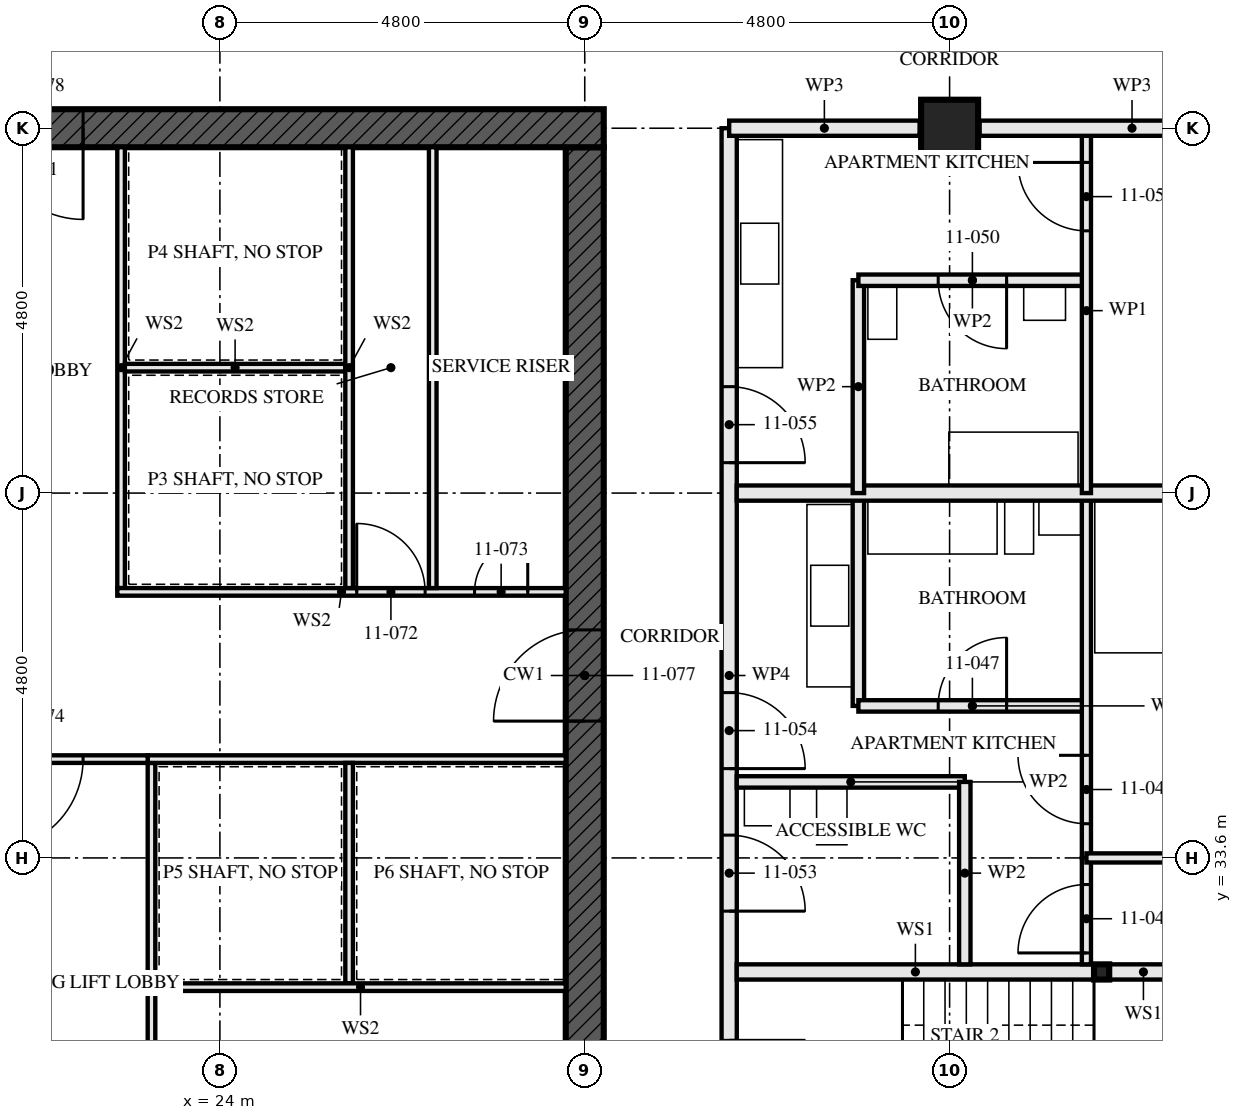
"""IFC4 building model, lengths in metres.
Left out: names, types, materials, properties, quantities, classifications, styles, units other than length and angle.
Written with IfcOpenShell. Run it as: python <this file> out.ifc"""

import sys

from ifc_helpers import new_model, si_unit, direction, frame, frame_2d, origin, origin_2d, place, context, subcontext, project, spatial, rectangle, hollow_rectangle, extrude, element, fill, save


model = new_model("IFC4")
c1 = context("Model", 3, precision=1e-05, world=origin(), true_north=direction((0.0, 1.0)))
c2 = subcontext(c1, "Body", "Model", "MODEL_VIEW")
j1 = project(units=[si_unit("LENGTHUNIT", "METRE"), si_unit("PLANEANGLEUNIT", "RADIAN")], contexts=[c1])
p1 = place(None, origin())
s1 = spatial("IfcSite", under=j1, at=p1, CompositionType="ELEMENT")
p2 = place(p1, origin())
s2 = spatial("IfcBuilding", under=s1, at=p2, CompositionType="ELEMENT")
p3 = place(p2, frame((0.0, 0.0, 44.5)))
s3 = spatial("IfcBuildingStorey", under=s2, at=p3, CompositionType="ELEMENT", Elevation=44.5)
p4 = place(p3, frame((33.6, 43.2, 0.0), z_axis=(0.0, 0.0, 1.0), x_axis=(0.0, 1.0, 0.0)))
e1 = element("IfcColumn", 1, at=p4, inside=s3, PredefinedType="COLUMN", context=c2, shape_type="SweptSolid", body=[
    extrude(hollow_rectangle(XDim=0.75, YDim=0.75, WallThickness=0.08, at=origin_2d()), origin(), (0.0, 0.0, 1.0), 3.5),
])
p5 = place(p3, frame((29.05, 43.2, -0.17), z_axis=(0.0, 0.0, 1.0), x_axis=(-1.0, 0.0, 0.0)))
e2 = element("IfcWall", 2, at=p5, inside=s3, PredefinedType="SHEAR", context=c2, shape_type="SweptSolid", body=[
    extrude(rectangle(XDim=14.9, YDim=0.5, at=frame_2d((7.45, 0.0))), origin(), (0.0, 0.0, 1.0), 3.5),
])
p6 = place(p5, frame((6.85, 0.0, 0.17)))
e3 = element("IfcOpeningElement", 3, at=p6, cuts=e2, PredefinedType="OPENING", context=c2, shape_type="SweptSolid", body=[
    extrude(rectangle(XDim=1.2, YDim=2.1, at=frame_2d((0.6, 1.05))), frame((0.0, 0.26, 0.0), z_axis=(0.0, -1.0, 0.0), x_axis=(1.0, 0.0, 0.0)), (0.0, 0.0, 1.0), 0.521),
])
p7 = place(p3, frame((28.8, 29.05, -0.17), z_axis=(0.0, 0.0, 1.0), x_axis=(0.0, 1.0, 0.0)))
e4 = element("IfcWall", 4, at=p7, inside=s3, PredefinedType="SHEAR", context=c2, shape_type="SweptSolid", body=[
    extrude(rectangle(XDim=13.9, YDim=0.5, at=frame_2d((6.95, 0.0))), origin(), (0.0, 0.0, 1.0), 3.5),
])
p8 = place(p7, frame((6.35, 0.0, 0.17)))
e5 = element("IfcOpeningElement", 5, at=p8, cuts=e4, PredefinedType="OPENING", context=c2, shape_type="SweptSolid", body=[
    extrude(rectangle(XDim=1.2, YDim=2.1, at=frame_2d((0.6, 1.05))), frame((0.0, 0.26, 0.0), z_axis=(0.0, -1.0, 0.0), x_axis=(1.0, 0.0, 0.0)), (0.0, 0.0, 1.0), 0.521),
])
p9 = place(p3, frame((35.6, 32.1, 0.0), z_axis=(0.0, 0.0, 1.0), x_axis=(1.0, 0.0, 0.0)))
e6 = element("IfcColumn", 6, at=p9, inside=s3, PredefinedType="COLUMN", context=c2, shape_type="SweptSolid", body=[
    extrude(hollow_rectangle(XDim=0.2, YDim=0.2, WallThickness=0.008, at=origin_2d()), origin(), (0.0, 0.0, 1.0), 3.33),
])
p10 = place(p3, frame((36.6, 32.1, 0.0), z_axis=(0.0, 0.0, 1.0), x_axis=(-1.0, 0.0, 0.0)))
e7 = element("IfcWall", 7, at=p10, inside=s3, PredefinedType="SOLIDWALL", context=c2, shape_type="SweptSolid", body=[
    extrude(rectangle(XDim=0.9, YDim=0.2, at=frame_2d((0.45, 0.0))), origin(), (0.0, 0.0, 1.0), 2.99),
])
p11 = place(p3, frame((35.5, 32.1, 0.0), z_axis=(0.0, 0.0, 1.0), x_axis=(-1.0, 0.0, 0.0)))
e8 = element("IfcWall", 8, at=p11, inside=s3, PredefinedType="SOLIDWALL", context=c2, shape_type="SweptSolid", body=[
    extrude(rectangle(XDim=4.7, YDim=0.2, at=frame_2d((2.35, 0.0))), origin(), (0.0, 0.0, 1.0), 2.99),
])
p12 = place(p3, frame((33.8, 32.2, 0.0), z_axis=(0.0, 0.0, 1.0), x_axis=(0.0, 1.0, 0.0)))
e9 = element("IfcWall", 9, at=p12, inside=s3, PredefinedType="PARTITIONING", context=c2, shape_type="SweptSolid", body=[
    extrude(rectangle(XDim=2.4, YDim=0.15, at=frame_2d((1.2, 0.0))), origin(), (0.0, 0.0, 1.0), 2.55),
])
p13 = place(p3, frame((33.8, 34.6, 0.0), z_axis=(0.0, 0.0, 1.0), x_axis=(-1.0, 0.0, 0.0)))
e10 = element("IfcWall", 10, at=p13, inside=s3, PredefinedType="PARTITIONING", context=c2, shape_type="SweptSolid", body=[
    extrude(rectangle(XDim=3.0, YDim=0.15, at=frame_2d((1.5, 0.0))), origin(), (0.0, 0.0, 1.0), 3.33),
])
p14 = place(p3, frame((35.4, 35.6, 0.0), z_axis=(0.0, 0.0, 1.0), x_axis=(-1.0, 0.0, 0.0)))
e11 = element("IfcWall", 11, at=p14, inside=s3, PredefinedType="PARTITIONING", context=c2, shape_type="SweptSolid", body=[
    extrude(rectangle(XDim=3.0, YDim=0.15, at=frame_2d((1.5, 0.0))), origin(), (0.0, 0.0, 1.0), 3.33),
])
p15 = place(p14, frame((1.05, 0.0, 0.0)))
e12 = element("IfcOpeningElement", 12, at=p15, cuts=e11, PredefinedType="OPENING", context=c2, shape_type="SweptSolid", body=[
    extrude(rectangle(XDim=0.9, YDim=2.1, at=frame_2d((0.45, 1.05))), frame((0.0, 0.085, 0.0), z_axis=(0.0, -1.0, 0.0), x_axis=(1.0, 0.0, 0.0)), (0.0, 0.0, 1.0), 0.171),
])
p16 = place(p3, frame((32.4, 35.6, 0.0), z_axis=(0.0, 0.0, 1.0), x_axis=(0.0, 1.0, 0.0)))
e13 = element("IfcWall", 13, at=p16, inside=s3, PredefinedType="PARTITIONING", context=c2, shape_type="SweptSolid", body=[
    extrude(rectangle(XDim=2.8, YDim=0.15, at=frame_2d((1.4, 0.0))), origin(), (0.0, 0.0, 1.0), 3.33),
])
p17 = place(p3, frame((35.4, 32.2, 0.0), z_axis=(0.0, 0.0, 1.0), x_axis=(0.0, 1.0, 0.0)))
e14 = element("IfcWall", 14, at=p17, inside=s3, PredefinedType="PARTITIONING", context=c2, shape_type="SweptSolid", body=[
    extrude(rectangle(XDim=1.4, YDim=0.12, at=frame_2d((0.7, 0.0))), origin(), (0.0, 0.0, 1.0), 3.33),
])
p18 = place(p17, frame((0.15, 0.0, 0.0)))
e15 = element("IfcOpeningElement", 15, at=p18, cuts=e14, PredefinedType="OPENING", context=c2, shape_type="SweptSolid", body=[
    extrude(rectangle(XDim=0.9, YDim=2.1, at=frame_2d((0.45, 1.05))), frame((0.0, 0.071, 0.0), z_axis=(0.0, -1.0, 0.0), x_axis=(1.0, 0.0, 0.0)), (0.0, 0.0, 1.0), 0.141),
])
p19 = place(p3, frame((35.4, 33.6, 0.0), z_axis=(0.0, 0.0, 1.0), x_axis=(0.0, 1.0, 0.0)))
e16 = element("IfcWall", 16, at=p19, inside=s3, PredefinedType="PARTITIONING", context=c2, shape_type="SweptSolid", body=[
    extrude(rectangle(XDim=4.8, YDim=0.12, at=frame_2d((2.4, 0.0))), origin(), (0.0, 0.0, 1.0), 3.33),
])
p20 = place(p19, frame((0.45, 0.0, 0.0)))
e17 = element("IfcOpeningElement", 17, at=p20, cuts=e16, PredefinedType="OPENING", context=c2, shape_type="SweptSolid", body=[
    extrude(rectangle(XDim=0.9, YDim=2.1, at=frame_2d((0.45, 1.05))), frame((0.0, 0.071, 0.0), z_axis=(0.0, -1.0, 0.0), x_axis=(1.0, 0.0, 0.0)), (0.0, 0.0, 1.0), 0.141),
])
p21 = place(p3, frame((42.805, 33.6, 0.0), z_axis=(0.0, 0.0, 1.0), x_axis=(-1.0, 0.0, 0.0)))
e18 = element("IfcWall", 18, at=p21, inside=s3, PredefinedType="PARTITIONING", context=c2, shape_type="SweptSolid", body=[
    extrude(rectangle(XDim=7.405, YDim=0.12, at=frame_2d((3.703, 0.0))), origin(), (0.0, 0.0, 1.0), 2.55),
])
p22 = place(p3, frame((42.805, 38.4, 0.0), z_axis=(0.0, 0.0, 1.0), x_axis=(-1.0, 0.0, 0.0)))
e19 = element("IfcWall", 19, at=p22, inside=s3, PredefinedType="PARTITIONING", context=c2, shape_type="SweptSolid", body=[
    extrude(rectangle(XDim=12.005, YDim=0.2, at=frame_2d((6.002, 0.0))), origin(), (0.0, 0.0, 1.0), 2.55),
])
p23 = place(p3, frame((35.4, 41.2, 0.0), z_axis=(0.0, 0.0, 1.0), x_axis=(-1.0, 0.0, 0.0)))
e20 = element("IfcWall", 20, at=p23, inside=s3, PredefinedType="PARTITIONING", context=c2, shape_type="SweptSolid", body=[
    extrude(rectangle(XDim=3.0, YDim=0.15, at=frame_2d((1.5, 0.0))), origin(), (0.0, 0.0, 1.0), 3.33),
])
p24 = place(p23, frame((1.05, 0.0, 0.0)))
e21 = element("IfcOpeningElement", 21, at=p24, cuts=e20, PredefinedType="OPENING", context=c2, shape_type="SweptSolid", body=[
    extrude(rectangle(XDim=0.9, YDim=2.1, at=frame_2d((0.45, 1.05))), frame((0.0, 0.085, 0.0), z_axis=(0.0, -1.0, 0.0), x_axis=(1.0, 0.0, 0.0)), (0.0, 0.0, 1.0), 0.171),
])
p25 = place(p3, frame((32.4, 38.4, 0.0), z_axis=(0.0, 0.0, 1.0), x_axis=(0.0, 1.0, 0.0)))
e22 = element("IfcWall", 22, at=p25, inside=s3, PredefinedType="PARTITIONING", context=c2, shape_type="SweptSolid", body=[
    extrude(rectangle(XDim=2.8, YDim=0.15, at=frame_2d((1.4, 0.0))), origin(), (0.0, 0.0, 1.0), 3.33),
])
p26 = place(p3, frame((35.4, 38.4, 0.0), z_axis=(0.0, 0.0, 1.0), x_axis=(0.0, 1.0, 0.0)))
e23 = element("IfcWall", 23, at=p26, inside=s3, PredefinedType="PARTITIONING", context=c2, shape_type="SweptSolid", body=[
    extrude(rectangle(XDim=4.8, YDim=0.12, at=frame_2d((2.4, 0.0))), origin(), (0.0, 0.0, 1.0), 3.33),
])
p27 = place(p26, frame((3.45, 0.0, 0.0)))
e24 = element("IfcOpeningElement", 24, at=p27, cuts=e23, PredefinedType="OPENING", context=c2, shape_type="SweptSolid", body=[
    extrude(rectangle(XDim=0.9, YDim=2.1, at=frame_2d((0.45, 1.05))), frame((0.0, 0.071, 0.0), z_axis=(0.0, -1.0, 0.0), x_axis=(1.0, 0.0, 0.0)), (0.0, 0.0, 1.0), 0.141),
])
p28 = place(p3, frame((30.7, 28.8, 0.0), z_axis=(0.0, 0.0, 1.0), x_axis=(0.0, 1.0, 0.0)))
e25 = element("IfcWall", 25, at=p28, inside=s3, PredefinedType="PARTITIONING", context=c2, shape_type="SweptSolid", body=[
    extrude(rectangle(XDim=14.4, YDim=0.2, at=frame_2d((7.2, 0.0))), origin(), (0.0, 0.0, 1.0), 2.55),
])
p29 = place(p28, frame((1.4, 0.0, 0.0)))
e26 = element("IfcOpeningElement", 26, at=p29, cuts=e25, PredefinedType="OPENING", context=c2, shape_type="SweptSolid", body=[
    extrude(rectangle(XDim=1.0, YDim=2.1, at=frame_2d((0.5, 1.05))), frame((0.0, 0.111, 0.0), z_axis=(0.0, -1.0, 0.0), x_axis=(1.0, 0.0, 0.0)), (0.0, 0.0, 1.0), 0.221),
])
p30 = place(p28, frame((4.1, 0.0, 0.0)))
e27 = element("IfcOpeningElement", 27, at=p30, cuts=e25, PredefinedType="OPENING", context=c2, shape_type="SweptSolid", body=[
    extrude(rectangle(XDim=1.0, YDim=2.1, at=frame_2d((0.5, 1.05))), frame((0.0, 0.111, 0.0), z_axis=(0.0, -1.0, 0.0), x_axis=(1.0, 0.0, 0.0)), (0.0, 0.0, 1.0), 0.221),
])
p31 = place(p28, frame((5.975, 0.0, 0.0)))
e28 = element("IfcOpeningElement", 28, at=p31, cuts=e25, PredefinedType="OPENING", context=c2, shape_type="SweptSolid", body=[
    extrude(rectangle(XDim=1.0, YDim=2.1, at=frame_2d((0.5, 1.05))), frame((0.0, 0.111, 0.0), z_axis=(0.0, -1.0, 0.0), x_axis=(1.0, 0.0, 0.0)), (0.0, 0.0, 1.0), 0.221),
])
p32 = place(p28, frame((10.0, 0.0, 0.0)))
e29 = element("IfcOpeningElement", 29, at=p32, cuts=e25, PredefinedType="OPENING", context=c2, shape_type="SweptSolid", body=[
    extrude(rectangle(XDim=1.0, YDim=2.1, at=frame_2d((0.5, 1.05))), frame((0.0, 0.111, 0.0), z_axis=(0.0, -1.0, 0.0), x_axis=(1.0, 0.0, 0.0)), (0.0, 0.0, 1.0), 0.221),
])
for number, where, z_axis, x_axis in (
    (30, (26.8, 37.15, 0.0), (0.0, 0.0, 1.0), (0.0, 1.0, 0.0)),
    (31, (22.7, 37.15, 0.0), (0.0, 0.0, 1.0), (0.0, 1.0, 0.0)),
):
    element("IfcWall", number, at=place(p3, frame(where, z_axis=z_axis, x_axis=x_axis)), inside=s3, PredefinedType="SOLIDWALL", context=c2, shape_type="SweptSolid", body=[
        extrude(rectangle(XDim=5.8, YDim=0.1, at=frame_2d((2.9, 0.0))), origin(), (0.0, 0.0, 1.0), 3.33),
    ])
p33 = place(p3, frame((23.1, 29.05, 0.0), z_axis=(0.0, 0.0, 1.0), x_axis=(0.0, 1.0, 0.0)))
e32 = element("IfcWall", 32, at=p33, inside=s3, PredefinedType="SOLIDWALL", context=c2, shape_type="SweptSolid", body=[
    extrude(rectangle(XDim=5.8, YDim=0.1, at=frame_2d((2.9, 0.0))), origin(), (0.0, 0.0, 1.0), 3.33),
])
p34 = place(p33, frame((1.0, 0.0, 0.0)))
e33 = element("IfcOpeningElement", 33, at=p34, cuts=e32, PredefinedType="OPENING", context=c2, shape_type="SweptSolid", body=[
    extrude(rectangle(XDim=0.7, YDim=2.1, at=frame_2d((0.35, 1.05))), frame((0.0, 0.061, 0.0), z_axis=(0.0, -1.0, 0.0), x_axis=(1.0, 0.0, 0.0)), (0.0, 0.0, 1.0), 0.121),
])
p35 = place(p3, frame((23.05, 34.9, 0.0), z_axis=(0.0, 0.0, 1.0), x_axis=(1.0, 0.0, 0.0)))
e34 = element("IfcWall", 34, at=p35, inside=s3, PredefinedType="SOLIDWALL", context=c2, shape_type="SweptSolid", body=[
    extrude(rectangle(XDim=5.5, YDim=0.1, at=frame_2d((2.75, 0.0))), origin(), (0.0, 0.0, 1.0), 3.33),
])
p36 = place(p3, frame((22.65, 37.1, 0.0), z_axis=(0.0, 0.0, 1.0), x_axis=(1.0, 0.0, 0.0)))
e35 = element("IfcWall", 35, at=p36, inside=s3, PredefinedType="SOLIDWALL", context=c2, shape_type="SweptSolid", body=[
    extrude(rectangle(XDim=5.9, YDim=0.1, at=frame_2d((2.95, 0.0))), origin(), (0.0, 0.0, 1.0), 3.33),
])
p37 = place(p36, frame((3.15, 0.0, 0.0)))
e36 = element("IfcOpeningElement", 36, at=p37, cuts=e35, PredefinedType="OPENING", context=c2, shape_type="SweptSolid", body=[
    extrude(rectangle(XDim=0.9, YDim=2.1, at=frame_2d((0.45, 1.05))), frame((0.0, 0.061, 0.0), z_axis=(0.0, -1.0, 0.0), x_axis=(1.0, 0.0, 0.0)), (0.0, 0.0, 1.0), 0.121),
])
p38 = place(p36, frame((4.7, 0.0, 0.0)))
e37 = element("IfcOpeningElement", 37, at=p38, cuts=e35, PredefinedType="OPENING", context=c2, shape_type="SweptSolid", body=[
    extrude(rectangle(XDim=0.7, YDim=2.1, at=frame_2d((0.35, 1.05))), frame((0.0, 0.061, 0.0), z_axis=(0.0, -1.0, 0.0), x_axis=(1.0, 0.0, 0.0)), (0.0, 0.0, 1.0), 0.121),
])
p39 = place(p3, frame((20.55, 34.9, 0.0), z_axis=(0.0, 0.0, 1.0), x_axis=(1.0, 0.0, 0.0)))
e38 = element("IfcWall", 38, at=p39, inside=s3, PredefinedType="SOLIDWALL", context=c2, shape_type="SweptSolid", body=[
    extrude(rectangle(XDim=2.5, YDim=0.1, at=frame_2d((1.25, 0.0))), origin(), (0.0, 0.0, 1.0), 3.33),
])
p40 = place(p39, frame((0.45, 0.0, 0.0)))
e39 = element("IfcOpeningElement", 39, at=p40, cuts=e38, PredefinedType="OPENING", context=c2, shape_type="SweptSolid", body=[
    extrude(rectangle(XDim=1.2, YDim=2.1, at=frame_2d((0.6, 1.05))), frame((0.0, 0.061, 0.0), z_axis=(0.0, -1.0, 0.0), x_axis=(1.0, 0.0, 0.0)), (0.0, 0.0, 1.0), 0.121),
])
p41 = place(p3, frame((22.75, 40.05, 0.0), z_axis=(0.0, 0.0, 1.0), x_axis=(1.0, 0.0, 0.0)))
e40 = element("IfcWall", 40, at=p41, inside=s3, PredefinedType="SOLIDWALL", context=c2, shape_type="SweptSolid", body=[
    extrude(rectangle(XDim=2.9, YDim=0.1, at=frame_2d((1.45, 0.0))), origin(), (0.0, 0.0, 1.0), 3.33),
])
p42 = place(p3, frame((25.7, 37.15, 0.0), z_axis=(0.0, 0.0, 1.0), x_axis=(0.0, 1.0, 0.0)))
e41 = element("IfcWall", 41, at=p42, inside=s3, PredefinedType="SOLIDWALL", context=c2, shape_type="SweptSolid", body=[
    extrude(rectangle(XDim=5.8, YDim=0.1, at=frame_2d((2.9, 0.0))), origin(), (0.0, 0.0, 1.0), 3.33),
])
p43 = place(p3, frame((25.7, 31.95, 0.0), z_axis=(0.0, 0.0, 1.0), x_axis=(0.0, 1.0, 0.0)))
e42 = element("IfcWall", 42, at=p43, inside=s3, PredefinedType="SOLIDWALL", context=c2, shape_type="SweptSolid", body=[
    extrude(rectangle(XDim=2.9, YDim=0.1, at=frame_2d((1.45, 0.0))), origin(), (0.0, 0.0, 1.0), 3.33),
])
p44 = place(p3, frame((23.15, 31.9, 0.0), z_axis=(0.0, 0.0, 1.0), x_axis=(1.0, 0.0, 0.0)))
e43 = element("IfcWall", 43, at=p44, inside=s3, PredefinedType="SOLIDWALL", context=c2, shape_type="SweptSolid", body=[
    extrude(rectangle(XDim=5.4, YDim=0.1, at=frame_2d((2.7, 0.0))), origin(), (0.0, 0.0, 1.0), 3.33),
])
p45 = place(p3, frame((38.005, 43.2, 0.0), z_axis=(0.0, 0.0, 1.0), x_axis=(-1.0, 0.0, 0.0)))
e44 = element("IfcWall", 44, at=p45, inside=s3, PredefinedType="PARTITIONING", context=c2, shape_type="SweptSolid", body=[
    extrude(rectangle(XDim=4.01, YDim=0.2, at=frame_2d((2.005, 0.0))), origin(), (0.0, 0.0, 1.0), 2.32),
])
p46 = place(p3, frame((33.205, 43.2, 0.0), z_axis=(0.0, 0.0, 1.0), x_axis=(-1.0, 0.0, 0.0)))
e45 = element("IfcWall", 45, at=p46, inside=s3, PredefinedType="PARTITIONING", context=c2, shape_type="SweptSolid", body=[
    extrude(rectangle(XDim=2.505, YDim=0.2, at=frame_2d((1.252, 0.0))), origin(), (0.0, 0.0, 1.0), 2.32),
])
p47 = place(p15, frame((0.9, 0.0, 0.0), z_axis=(0.0, 0.0, 1.0), x_axis=(-1.0, 0.0, 0.0)))
e46 = element("IfcDoor", 46, at=p47, inside=s3, OperationType="SINGLE_SWING_LEFT", PredefinedType="DOOR", context=c2, shape_type="SweptSolid", body=[
    extrude(rectangle(XDim=0.9, YDim=2.1, at=frame_2d((0.45, 1.05))), frame((0.0, 0.022, 0.0), z_axis=(0.0, -1.0, 0.0), x_axis=(1.0, 0.0, 0.0)), (0.0, 0.0, 1.0), 0.044),
])
fill(e12, e46)
p48 = place(p18, origin())
e47 = element("IfcDoor", 47, at=p48, inside=s3, OperationType="SINGLE_SWING_RIGHT", PredefinedType="DOOR", context=c2, shape_type="SweptSolid", body=[
    extrude(rectangle(XDim=0.9, YDim=2.1, at=frame_2d((0.45, 1.05))), frame((0.0, 0.022, 0.0), z_axis=(0.0, -1.0, 0.0), x_axis=(1.0, 0.0, 0.0)), (0.0, 0.0, 1.0), 0.044),
])
fill(e15, e47)
p49 = place(p20, origin())
e48 = element("IfcDoor", 48, at=p49, inside=s3, OperationType="SINGLE_SWING_LEFT", PredefinedType="DOOR", context=c2, shape_type="SweptSolid", body=[
    extrude(rectangle(XDim=0.9, YDim=2.1, at=frame_2d((0.45, 1.05))), frame((0.0, 0.022, 0.0), z_axis=(0.0, -1.0, 0.0), x_axis=(1.0, 0.0, 0.0)), (0.0, 0.0, 1.0), 0.044),
])
fill(e17, e48)
p50 = place(p24, origin())
e49 = element("IfcDoor", 49, at=p50, inside=s3, OperationType="SINGLE_SWING_RIGHT", PredefinedType="DOOR", context=c2, shape_type="SweptSolid", body=[
    extrude(rectangle(XDim=0.9, YDim=2.1, at=frame_2d((0.45, 1.05))), frame((0.0, 0.022, 0.0), z_axis=(0.0, -1.0, 0.0), x_axis=(1.0, 0.0, 0.0)), (0.0, 0.0, 1.0), 0.044),
])
fill(e21, e49)
p51 = place(p27, origin())
e50 = element("IfcDoor", 50, at=p51, inside=s3, OperationType="SINGLE_SWING_LEFT", PredefinedType="DOOR", context=c2, shape_type="SweptSolid", body=[
    extrude(rectangle(XDim=0.9, YDim=2.1, at=frame_2d((0.45, 1.05))), frame((0.0, 0.022, 0.0), z_axis=(0.0, -1.0, 0.0), x_axis=(1.0, 0.0, 0.0)), (0.0, 0.0, 1.0), 0.044),
])
fill(e24, e50)
p52 = place(p30, frame((1.0, 0.0, 0.0), z_axis=(0.0, 0.0, 1.0), x_axis=(-1.0, 0.0, 0.0)))
e51 = element("IfcDoor", 51, at=p52, inside=s3, OperationType="SINGLE_SWING_LEFT", PredefinedType="DOOR", context=c2, shape_type="SweptSolid", body=[
    extrude(rectangle(XDim=1.0, YDim=2.1, at=frame_2d((0.5, 1.05))), frame((0.0, 0.027, 0.0), z_axis=(0.0, -1.0, 0.0), x_axis=(1.0, 0.0, 0.0)), (0.0, 0.0, 1.0), 0.054),
])
fill(e27, e51)
p53 = place(p31, frame((1.0, 0.0, 0.0), z_axis=(0.0, 0.0, 1.0), x_axis=(-1.0, 0.0, 0.0)))
e52 = element("IfcDoor", 52, at=p53, inside=s3, OperationType="SINGLE_SWING_LEFT", PredefinedType="DOOR", context=c2, shape_type="SweptSolid", body=[
    extrude(rectangle(XDim=1.0, YDim=2.1, at=frame_2d((0.5, 1.05))), frame((0.0, 0.027, 0.0), z_axis=(0.0, -1.0, 0.0), x_axis=(1.0, 0.0, 0.0)), (0.0, 0.0, 1.0), 0.054),
])
fill(e28, e52)
p54 = place(p32, frame((1.0, 0.0, 0.0), z_axis=(0.0, 0.0, 1.0), x_axis=(-1.0, 0.0, 0.0)))
e53 = element("IfcDoor", 53, at=p54, inside=s3, OperationType="SINGLE_SWING_LEFT", PredefinedType="DOOR", context=c2, shape_type="SweptSolid", body=[
    extrude(rectangle(XDim=1.0, YDim=2.1, at=frame_2d((0.5, 1.05))), frame((0.0, 0.027, 0.0), z_axis=(0.0, -1.0, 0.0), x_axis=(1.0, 0.0, 0.0)), (0.0, 0.0, 1.0), 0.054),
])
fill(e29, e53)
p55 = place(p37, origin())
e54 = element("IfcDoor", 54, at=p55, inside=s3, OperationType="SINGLE_SWING_RIGHT", PredefinedType="DOOR", context=c2, shape_type="SweptSolid", body=[
    extrude(rectangle(XDim=0.9, YDim=2.1, at=frame_2d((0.45, 1.05))), frame((0.0, 0.027, 0.0), z_axis=(0.0, -1.0, 0.0), x_axis=(1.0, 0.0, 0.0)), (0.0, 0.0, 1.0), 0.054),
])
fill(e36, e54)
p56 = place(p38, origin())
e55 = element("IfcDoor", 55, at=p56, inside=s3, OperationType="SINGLE_SWING_LEFT", PredefinedType="DOOR", context=c2, shape_type="SweptSolid", body=[
    extrude(rectangle(XDim=0.7, YDim=2.1, at=frame_2d((0.35, 1.05))), frame((0.0, 0.027, 0.0), z_axis=(0.0, -1.0, 0.0), x_axis=(1.0, 0.0, 0.0)), (0.0, 0.0, 1.0), 0.054),
])
fill(e37, e55)
p57 = place(p40, frame((1.2, 0.0, 0.0), z_axis=(0.0, 0.0, 1.0), x_axis=(-1.0, 0.0, 0.0)))
e56 = element("IfcDoor", 56, at=p57, inside=s3, OperationType="SINGLE_SWING_LEFT", PredefinedType="DOOR", context=c2, shape_type="SweptSolid", body=[
    extrude(rectangle(XDim=1.2, YDim=2.1, at=frame_2d((0.6, 1.05))), frame((0.0, 0.027, 0.0), z_axis=(0.0, -1.0, 0.0), x_axis=(1.0, 0.0, 0.0)), (0.0, 0.0, 1.0), 0.054),
])
fill(e39, e56)
p58 = place(p8, origin())
e57 = element("IfcDoor", 57, at=p58, inside=s3, OperationType="SINGLE_SWING_LEFT", PredefinedType="DOOR", context=c2, shape_type="SweptSolid", body=[
    extrude(rectangle(XDim=1.2, YDim=2.1, at=frame_2d((0.6, 1.05))), frame((0.0, 0.027, 0.0), z_axis=(0.0, -1.0, 0.0), x_axis=(1.0, 0.0, 0.0)), (0.0, 0.0, 1.0), 0.054),
])
fill(e5, e57)
p59 = place(p6, origin())
e58 = element("IfcDoor", 58, at=p59, inside=s3, OperationType="SINGLE_SWING_LEFT", PredefinedType="DOOR", context=c2, shape_type="SweptSolid", body=[
    extrude(rectangle(XDim=1.2, YDim=2.1, at=frame_2d((0.6, 1.05))), frame((0.0, 0.027, 0.0), z_axis=(0.0, -1.0, 0.0), x_axis=(1.0, 0.0, 0.0)), (0.0, 0.0, 1.0), 0.054),
])
fill(e3, e58)
save(model, sys.argv[1])
